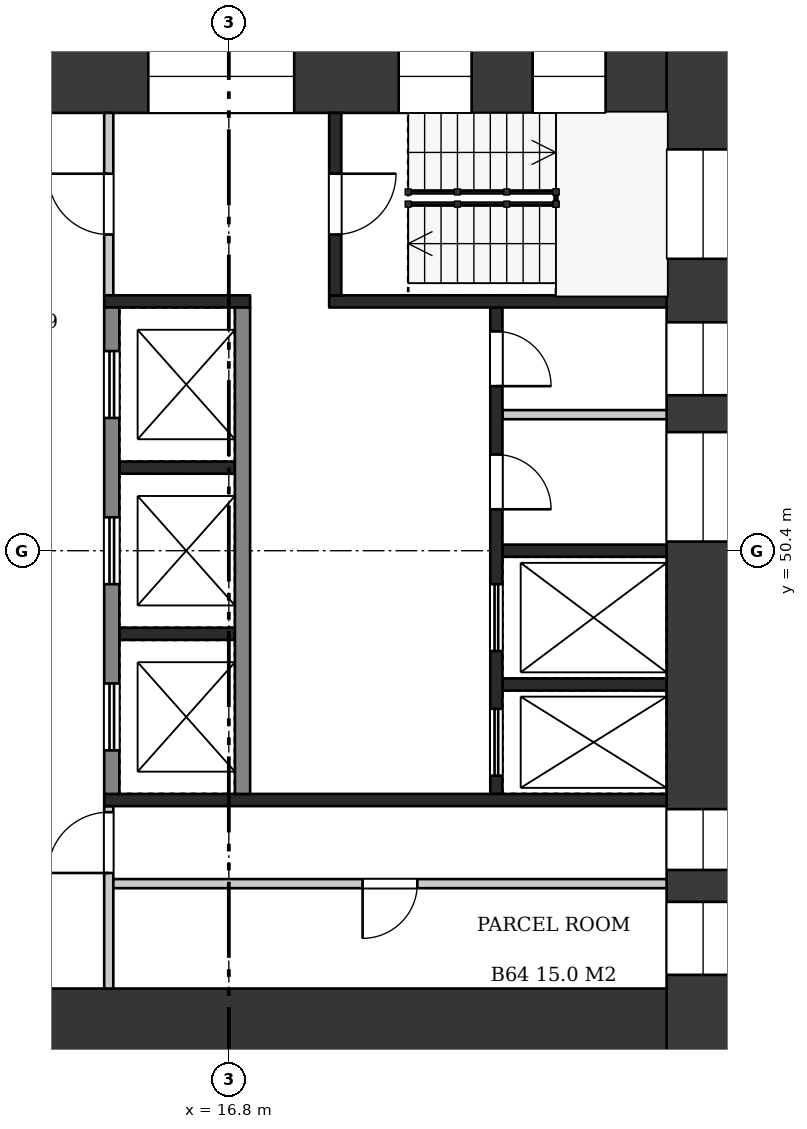
"""IFC4 building model, lengths in metres.
Left out: names, types, materials, properties, quantities, classifications, styles, units other than length and angle.
Written with IfcOpenShell. Run it as: python <this file> out.ifc"""

import sys

from ifc_helpers import new_model, si_unit, direction, frame, frame_2d, origin, place, context, subcontext, project, spatial, rectangle, extrude, element, fill, save


model = new_model("IFC4")
c1 = context("Model", 3, precision=1e-05, world=origin(), true_north=direction((0.0, 1.0)))
c2 = subcontext(c1, "Body", "Model", "MODEL_VIEW")
j1 = project(units=[si_unit("LENGTHUNIT", "METRE"), si_unit("PLANEANGLEUNIT", "RADIAN")], contexts=[c1])
p1 = place(None, origin())
s1 = spatial("IfcSite", under=j1, at=p1, CompositionType="ELEMENT")
p2 = place(p1, origin())
s2 = spatial("IfcBuilding", under=s1, at=p2, CompositionType="ELEMENT")
p3 = place(p2, frame((0.0, 0.0, 245.7)))
s3 = spatial("IfcBuildingStorey", under=s2, at=p3, CompositionType="ELEMENT", Elevation=245.7)
p4 = place(p3, frame((24.6, 58.8, 0.0), z_axis=(0.0, 0.0, 1.0), x_axis=(0.0, -1.0, 0.0)))
e1 = element("IfcWall", 1, at=p4, inside=s3, PredefinedType="SHEAR", context=c2, shape_type="SweptSolid", body=[
    extrude(rectangle(XDim=16.8, YDim=1.2, at=frame_2d((8.4, 0.0))), origin(), (0.0, 0.0, 1.0), 3.22),
])
p5 = place(p4, frame((1.8, 0.0, 0.5)))
e2 = element("IfcOpeningElement", 2, at=p5, cuts=e1, PredefinedType="OPENING", context=c2, shape_type="SweptSolid", body=[
    extrude(rectangle(XDim=1.8, YDim=2.4, at=frame_2d((0.9, 1.2))), frame((0.0, 0.61, 0.0), z_axis=(0.0, -1.0, 0.0), x_axis=(1.0, 0.0, 0.0)), (0.0, 0.0, 1.0), 1.22),
])
p6 = place(p4, frame((4.644, 0.0, 1.6)))
e3 = element("IfcOpeningElement", 3, at=p6, cuts=e1, PredefinedType="OPENING", context=c2, shape_type="SweptSolid", body=[
    extrude(rectangle(XDim=1.2, YDim=1.2, at=frame_2d((0.6, 0.6))), frame((0.0, 0.61, 0.0), z_axis=(0.0, -1.0, 0.0), x_axis=(1.0, 0.0, 0.0)), (0.0, 0.0, 1.0), 1.22),
])
p7 = place(p4, frame((6.45, 0.0, 1.6)))
e4 = element("IfcOpeningElement", 4, at=p7, cuts=e1, PredefinedType="OPENING", context=c2, shape_type="SweptSolid", body=[
    extrude(rectangle(XDim=1.8, YDim=1.2, at=frame_2d((0.9, 0.6))), frame((0.0, 0.61, 0.0), z_axis=(0.0, -1.0, 0.0), x_axis=(1.0, 0.0, 0.0)), (0.0, 0.0, 1.0), 1.22),
])
p8 = place(p4, frame((12.65, 0.0, 0.6)))
e5 = element("IfcOpeningElement", 5, at=p8, cuts=e1, PredefinedType="OPENING", context=c2, shape_type="SweptSolid", body=[
    extrude(rectangle(XDim=1.0, YDim=2.1, at=frame_2d((0.5, 1.05))), frame((0.0, 0.61, 0.0), z_axis=(0.0, -1.0, 0.0), x_axis=(1.0, 0.0, 0.0)), (0.0, 0.0, 1.0), 1.22),
])
p9 = place(p4, frame((14.175, 0.0, 1.6)))
e6 = element("IfcOpeningElement", 6, at=p9, cuts=e1, PredefinedType="OPENING", context=c2, shape_type="SweptSolid", body=[
    extrude(rectangle(XDim=1.2, YDim=1.2, at=frame_2d((0.6, 0.6))), frame((0.0, 0.61, 0.0), z_axis=(0.0, -1.0, 0.0), x_axis=(1.0, 0.0, 0.0)), (0.0, 0.0, 1.0), 1.22),
])
p10 = place(p3, frame((9.6, 58.2, 0.0), z_axis=(0.0, 0.0, 1.0), x_axis=(1.0, 0.0, 0.0)))
e7 = element("IfcWall", 7, at=p10, inside=s3, PredefinedType="SHEAR", context=c2, shape_type="SweptSolid", body=[
    extrude(rectangle(XDim=14.4, YDim=1.2, at=frame_2d((7.2, 0.0))), origin(), (0.0, 0.0, 1.0), 3.22),
])
p11 = place(p10, frame((1.105, 0.0, 0.6)))
e8 = element("IfcOpeningElement", 8, at=p11, cuts=e7, PredefinedType="OPENING", context=c2, shape_type="SweptSolid", body=[
    extrude(rectangle(XDim=3.0, YDim=2.1, at=frame_2d((1.5, 1.05))), frame((0.0, 0.61, 0.0), z_axis=(0.0, -1.0, 0.0), x_axis=(1.0, 0.0, 0.0)), (0.0, 0.0, 1.0), 1.22),
])
p12 = place(p10, frame((5.875, 0.0, 0.6)))
e9 = element("IfcOpeningElement", 9, at=p12, cuts=e7, PredefinedType="OPENING", context=c2, shape_type="SweptSolid", body=[
    extrude(rectangle(XDim=2.4, YDim=2.1, at=frame_2d((1.2, 1.05))), frame((0.0, 0.61, 0.0), z_axis=(0.0, -1.0, 0.0), x_axis=(1.0, 0.0, 0.0)), (0.0, 0.0, 1.0), 1.22),
])
p13 = place(p10, frame((9.993, 0.0, 0.5)))
e10 = element("IfcOpeningElement", 10, at=p13, cuts=e7, PredefinedType="OPENING", context=c2, shape_type="SweptSolid", body=[
    extrude(rectangle(XDim=1.2, YDim=2.4, at=frame_2d((0.6, 1.2))), frame((0.0, 0.61, 0.0), z_axis=(0.0, -1.0, 0.0), x_axis=(1.0, 0.0, 0.0)), (0.0, 0.0, 1.0), 1.22),
])
p14 = place(p10, frame((12.197, 0.0, 0.5)))
e11 = element("IfcOpeningElement", 11, at=p14, cuts=e7, PredefinedType="OPENING", context=c2, shape_type="SweptSolid", body=[
    extrude(rectangle(XDim=1.2, YDim=2.4, at=frame_2d((0.6, 1.2))), frame((0.0, 0.61, 0.0), z_axis=(0.0, -1.0, 0.0), x_axis=(1.0, 0.0, 0.0)), (0.0, 0.0, 1.0), 1.22),
])
p15 = place(p3, frame((9.6, 42.6, 0.0), z_axis=(0.0, 0.0, 1.0), x_axis=(1.0, 0.0, 0.0)))
e12 = element("IfcWall", 12, at=p15, inside=s3, PredefinedType="SHEAR", context=c2, shape_type="SweptSolid", body=[
    extrude(rectangle(XDim=14.4, YDim=1.2, at=frame_2d((7.2, 0.0))), origin(), (0.0, 0.0, 1.0), 3.22),
])
p16 = place(p15, frame((2.1, 0.0, 0.0)))
e13 = element("IfcOpeningElement", 13, at=p16, cuts=e12, PredefinedType="OPENING", context=c2, shape_type="SweptSolid", body=[
    extrude(rectangle(XDim=1.8, YDim=2.1, at=frame_2d((0.9, 1.05))), frame((0.0, 0.61, 0.0), z_axis=(0.0, -1.0, 0.0), x_axis=(1.0, 0.0, 0.0)), (0.0, 0.0, 1.0), 1.22),
])
for number, where, z_axis, x_axis in (
    (14, (15.0, 51.767, 0.0), (0.0, 0.0, 1.0), (1.0, 0.0, 0.0)),
    (15, (15.0, 49.033, 0.0), (0.0, 0.0, 1.0), (1.0, 0.0, 0.0)),
):
    element("IfcWall", number, at=place(p3, frame(where, z_axis=z_axis, x_axis=x_axis)), inside=s3, PredefinedType="SHEAR", context=c2, shape_type="SweptSolid", body=[
        extrude(rectangle(XDim=1.9, YDim=0.2, at=frame_2d((0.95, 0.0))), origin(), (0.0, 0.0, 1.0), 3.22),
    ])
p17 = place(p3, frame((14.875, 54.4, 0.0), z_axis=(0.0, 0.0, 1.0), x_axis=(0.0, -1.0, 0.0)))
e16 = element("IfcWall", 16, at=p17, inside=s3, PredefinedType="SHEAR", context=c2, shape_type="SweptSolid", body=[
    extrude(rectangle(XDim=8.0, YDim=0.25, at=frame_2d((4.0, 0.0))), origin(), (0.0, 0.0, 1.0), 3.22),
])
p18 = place(p17, frame((0.717, 0.0, 0.0)))
e17 = element("IfcOpeningElement", 17, at=p18, cuts=e16, PredefinedType="OPENING", context=c2, shape_type="SweptSolid", body=[
    extrude(rectangle(XDim=1.1, YDim=2.1, at=frame_2d((0.55, 1.05))), frame((0.0, 0.135, 0.0), z_axis=(0.0, -1.0, 0.0), x_axis=(1.0, 0.0, 0.0)), (0.0, 0.0, 1.0), 0.27),
])
p19 = place(p17, frame((3.45, 0.0, 0.0)))
e18 = element("IfcOpeningElement", 18, at=p19, cuts=e16, PredefinedType="OPENING", context=c2, shape_type="SweptSolid", body=[
    extrude(rectangle(XDim=1.1, YDim=2.1, at=frame_2d((0.55, 1.05))), frame((0.0, 0.135, 0.0), z_axis=(0.0, -1.0, 0.0), x_axis=(1.0, 0.0, 0.0)), (0.0, 0.0, 1.0), 0.27),
])
p20 = place(p17, frame((6.183, 0.0, 0.0)))
e19 = element("IfcOpeningElement", 19, at=p20, cuts=e16, PredefinedType="OPENING", context=c2, shape_type="SweptSolid", body=[
    extrude(rectangle(XDim=1.1, YDim=2.1, at=frame_2d((0.55, 1.05))), frame((0.0, 0.135, 0.0), z_axis=(0.0, -1.0, 0.0), x_axis=(1.0, 0.0, 0.0)), (0.0, 0.0, 1.0), 0.27),
])
p21 = place(p3, frame((17.025, 54.4, 0.0), z_axis=(0.0, 0.0, 1.0), x_axis=(0.0, -1.0, 0.0)))
e20 = element("IfcWall", 20, at=p21, inside=s3, PredefinedType="SHEAR", context=c2, shape_type="SweptSolid", body=[
    extrude(rectangle(XDim=8.0, YDim=0.25, at=frame_2d((4.0, 0.0))), origin(), (0.0, 0.0, 1.0), 3.22),
])
for number, where, z_axis, x_axis in (
    (21, (21.3, 50.4, 0.0), (0.0, 0.0, 1.0), (1.0, 0.0, 0.0)),
    (22, (21.3, 48.2, 0.0), (0.0, 0.0, 1.0), (1.0, 0.0, 0.0)),
):
    element("IfcWall", number, at=place(p3, frame(where, z_axis=z_axis, x_axis=x_axis)), inside=s3, PredefinedType="SHEAR", context=c2, shape_type="SweptSolid", body=[
        extrude(rectangle(XDim=2.7, YDim=0.2, at=frame_2d((1.35, 0.0))), origin(), (0.0, 0.0, 1.0), 3.22),
    ])
p22 = place(p3, frame((21.3, 52.637, 0.0), z_axis=(0.0, 0.0, 1.0), x_axis=(1.0, 0.0, 0.0)))
e23 = element("IfcWall", 23, at=p22, inside=s3, PredefinedType="PARTITIONING", context=c2, shape_type="SweptSolid", body=[
    extrude(rectangle(XDim=2.7, YDim=0.15, at=frame_2d((1.35, 0.0))), origin(), (0.0, 0.0, 1.0), 3.22),
])
p23 = place(p3, frame((21.2, 54.4, 0.0), z_axis=(0.0, 0.0, 1.0), x_axis=(0.0, -1.0, 0.0)))
e24 = element("IfcWall", 24, at=p23, inside=s3, PredefinedType="SHEAR", context=c2, shape_type="SweptSolid", body=[
    extrude(rectangle(XDim=8.0, YDim=0.2, at=frame_2d((4.0, 0.0))), origin(), (0.0, 0.0, 1.0), 3.22),
])
p24 = place(p23, frame((0.394, 0.0, 0.0)))
e25 = element("IfcOpeningElement", 25, at=p24, cuts=e24, PredefinedType="OPENING", context=c2, shape_type="SweptSolid", body=[
    extrude(rectangle(XDim=0.9, YDim=2.1, at=frame_2d((0.45, 1.05))), frame((0.0, 0.11, 0.0), z_axis=(0.0, -1.0, 0.0), x_axis=(1.0, 0.0, 0.0)), (0.0, 0.0, 1.0), 0.22),
])
p25 = place(p23, frame((2.419, 0.0, 0.0)))
e26 = element("IfcOpeningElement", 26, at=p25, cuts=e24, PredefinedType="OPENING", context=c2, shape_type="SweptSolid", body=[
    extrude(rectangle(XDim=0.9, YDim=2.1, at=frame_2d((0.45, 1.05))), frame((0.0, 0.11, 0.0), z_axis=(0.0, -1.0, 0.0), x_axis=(1.0, 0.0, 0.0)), (0.0, 0.0, 1.0), 0.22),
])
p26 = place(p23, frame((4.55, 0.0, 0.0)))
e27 = element("IfcOpeningElement", 27, at=p26, cuts=e24, PredefinedType="OPENING", context=c2, shape_type="SweptSolid", body=[
    extrude(rectangle(XDim=1.1, YDim=2.1, at=frame_2d((0.55, 1.05))), frame((0.0, 0.11, 0.0), z_axis=(0.0, -1.0, 0.0), x_axis=(1.0, 0.0, 0.0)), (0.0, 0.0, 1.0), 0.22),
])
p27 = place(p23, frame((6.6, 0.0, 0.0)))
e28 = element("IfcOpeningElement", 28, at=p27, cuts=e24, PredefinedType="OPENING", context=c2, shape_type="SweptSolid", body=[
    extrude(rectangle(XDim=1.1, YDim=2.1, at=frame_2d((0.55, 1.05))), frame((0.0, 0.11, 0.0), z_axis=(0.0, -1.0, 0.0), x_axis=(1.0, 0.0, 0.0)), (0.0, 0.0, 1.0), 0.22),
])
p28 = place(p3, frame((14.75, 54.5, 0.0), z_axis=(0.0, 0.0, 1.0), x_axis=(1.0, 0.0, 0.0)))
e29 = element("IfcWall", 29, at=p28, inside=s3, PredefinedType="SHEAR", context=c2, shape_type="SweptSolid", body=[
    extrude(rectangle(XDim=2.4, YDim=0.2, at=frame_2d((1.2, 0.0))), origin(), (0.0, 0.0, 1.0), 3.22),
])
p29 = place(p3, frame((18.45, 54.5, 0.0), z_axis=(0.0, 0.0, 1.0), x_axis=(1.0, 0.0, 0.0)))
e30 = element("IfcWall", 30, at=p29, inside=s3, PredefinedType="SHEAR", context=c2, shape_type="SweptSolid", body=[
    extrude(rectangle(XDim=5.55, YDim=0.2, at=frame_2d((2.775, 0.0))), origin(), (0.0, 0.0, 1.0), 3.22),
])
p30 = place(p3, frame((14.825, 57.6, 0.0), z_axis=(0.0, 0.0, 1.0), x_axis=(0.0, -1.0, 0.0)))
e31 = element("IfcWall", 31, at=p30, inside=s3, PredefinedType="PARTITIONING", context=c2, shape_type="SweptSolid", body=[
    extrude(rectangle(XDim=3.0, YDim=0.15, at=frame_2d((1.5, 0.0))), origin(), (0.0, 0.0, 1.0), 3.22),
])
p31 = place(p30, frame((1.0, 0.0, 0.0)))
e32 = element("IfcOpeningElement", 32, at=p31, cuts=e31, PredefinedType="OPENING", context=c2, shape_type="SweptSolid", body=[
    extrude(rectangle(XDim=1.0, YDim=2.1, at=frame_2d((0.5, 1.05))), frame((0.0, 0.085, 0.0), z_axis=(0.0, -1.0, 0.0), x_axis=(1.0, 0.0, 0.0)), (0.0, 0.0, 1.0), 0.17),
])
p32 = place(p3, frame((18.55, 57.6, 0.0), z_axis=(0.0, 0.0, 1.0), x_axis=(0.0, -1.0, 0.0)))
e33 = element("IfcWall", 33, at=p32, inside=s3, PredefinedType="SHEAR", context=c2, shape_type="SweptSolid", body=[
    extrude(rectangle(XDim=3.0, YDim=0.2, at=frame_2d((1.5, 0.0))), origin(), (0.0, 0.0, 1.0), 3.22),
])
p33 = place(p32, frame((1.0, 0.0, 0.0)))
e34 = element("IfcOpeningElement", 34, at=p33, cuts=e33, PredefinedType="OPENING", context=c2, shape_type="SweptSolid", body=[
    extrude(rectangle(XDim=1.0, YDim=2.1, at=frame_2d((0.5, 1.05))), frame((0.0, 0.11, 0.0), z_axis=(0.0, -1.0, 0.0), x_axis=(1.0, 0.0, 0.0)), (0.0, 0.0, 1.0), 0.22),
])
p34 = place(p3, frame((14.75, 46.3, 0.0), z_axis=(0.0, 0.0, 1.0), x_axis=(1.0, 0.0, 0.0)))
e35 = element("IfcWall", 35, at=p34, inside=s3, PredefinedType="SHEAR", context=c2, shape_type="SweptSolid", body=[
    extrude(rectangle(XDim=9.25, YDim=0.2, at=frame_2d((4.625, 0.0))), origin(), (0.0, 0.0, 1.0), 3.22),
])
p35 = place(p3, frame((14.825, 46.2, 0.0), z_axis=(0.0, 0.0, 1.0), x_axis=(0.0, -1.0, 0.0)))
e36 = element("IfcWall", 36, at=p35, inside=s3, PredefinedType="PARTITIONING", context=c2, shape_type="SweptSolid", body=[
    extrude(rectangle(XDim=3.0, YDim=0.15, at=frame_2d((1.5, 0.0))), origin(), (0.0, 0.0, 1.0), 3.22),
])
p36 = place(p35, frame((0.1, 0.0, 0.0)))
e37 = element("IfcOpeningElement", 37, at=p36, cuts=e36, PredefinedType="OPENING", context=c2, shape_type="SweptSolid", body=[
    extrude(rectangle(XDim=1.0, YDim=2.1, at=frame_2d((0.5, 1.05))), frame((0.0, 0.085, 0.0), z_axis=(0.0, -1.0, 0.0), x_axis=(1.0, 0.0, 0.0)), (0.0, 0.0, 1.0), 0.17),
])
p37 = place(p3, frame((14.9, 44.925, 0.0), z_axis=(0.0, 0.0, 1.0), x_axis=(1.0, 0.0, 0.0)))
e38 = element("IfcWall", 38, at=p37, inside=s3, PredefinedType="PARTITIONING", context=c2, shape_type="SweptSolid", body=[
    extrude(rectangle(XDim=9.1, YDim=0.15, at=frame_2d((4.55, 0.0))), origin(), (0.0, 0.0, 1.0), 3.22),
])
p38 = place(p37, frame((4.1, 0.0, 0.0)))
e39 = element("IfcOpeningElement", 39, at=p38, cuts=e38, PredefinedType="OPENING", context=c2, shape_type="SweptSolid", body=[
    extrude(rectangle(XDim=0.9, YDim=2.1, at=frame_2d((0.45, 1.05))), frame((0.0, 0.085, 0.0), z_axis=(0.0, -1.0, 0.0), x_axis=(1.0, 0.0, 0.0)), (0.0, 0.0, 1.0), 0.17),
])
p39 = place(p18, origin())
e40 = element("IfcDoor", 40, at=p39, inside=s3, OperationType="DOUBLE_DOOR_SLIDING", PredefinedType="DOOR", context=c2, shape_type="SweptSolid", body=[
    extrude(rectangle(XDim=1.1, YDim=2.1, at=frame_2d((0.55, 1.05))), frame((0.0, 0.025, 0.0), z_axis=(0.0, -1.0, 0.0), x_axis=(1.0, 0.0, 0.0)), (0.0, 0.0, 1.0), 0.05),
])
fill(e17, e40)
p40 = place(p19, origin())
e41 = element("IfcDoor", 41, at=p40, inside=s3, OperationType="DOUBLE_DOOR_SLIDING", PredefinedType="DOOR", context=c2, shape_type="SweptSolid", body=[
    extrude(rectangle(XDim=1.1, YDim=2.1, at=frame_2d((0.55, 1.05))), frame((0.0, 0.025, 0.0), z_axis=(0.0, -1.0, 0.0), x_axis=(1.0, 0.0, 0.0)), (0.0, 0.0, 1.0), 0.05),
])
fill(e18, e41)
p41 = place(p20, origin())
e42 = element("IfcDoor", 42, at=p41, inside=s3, OperationType="DOUBLE_DOOR_SLIDING", PredefinedType="DOOR", context=c2, shape_type="SweptSolid", body=[
    extrude(rectangle(XDim=1.1, YDim=2.1, at=frame_2d((0.55, 1.05))), frame((0.0, 0.025, 0.0), z_axis=(0.0, -1.0, 0.0), x_axis=(1.0, 0.0, 0.0)), (0.0, 0.0, 1.0), 0.05),
])
fill(e19, e42)
p42 = place(p24, origin())
e43 = element("IfcDoor", 43, at=p42, inside=s3, OperationType="SINGLE_SWING_RIGHT", PredefinedType="DOOR", context=c2, shape_type="SweptSolid", body=[
    extrude(rectangle(XDim=0.9, YDim=2.1, at=frame_2d((0.45, 1.05))), frame((0.0, 0.025, 0.0), z_axis=(0.0, -1.0, 0.0), x_axis=(1.0, 0.0, 0.0)), (0.0, 0.0, 1.0), 0.05),
])
fill(e25, e43)
p43 = place(p25, origin())
e44 = element("IfcDoor", 44, at=p43, inside=s3, OperationType="SINGLE_SWING_RIGHT", PredefinedType="DOOR", context=c2, shape_type="SweptSolid", body=[
    extrude(rectangle(XDim=0.9, YDim=2.1, at=frame_2d((0.45, 1.05))), frame((0.0, 0.025, 0.0), z_axis=(0.0, -1.0, 0.0), x_axis=(1.0, 0.0, 0.0)), (0.0, 0.0, 1.0), 0.05),
])
fill(e26, e44)
p44 = place(p26, origin())
e45 = element("IfcDoor", 45, at=p44, inside=s3, OperationType="DOUBLE_DOOR_SLIDING", PredefinedType="DOOR", context=c2, shape_type="SweptSolid", body=[
    extrude(rectangle(XDim=1.1, YDim=2.1, at=frame_2d((0.55, 1.05))), frame((0.0, 0.025, 0.0), z_axis=(0.0, -1.0, 0.0), x_axis=(1.0, 0.0, 0.0)), (0.0, 0.0, 1.0), 0.05),
])
fill(e27, e45)
p45 = place(p27, origin())
e46 = element("IfcDoor", 46, at=p45, inside=s3, OperationType="DOUBLE_DOOR_SLIDING", PredefinedType="DOOR", context=c2, shape_type="SweptSolid", body=[
    extrude(rectangle(XDim=1.1, YDim=2.1, at=frame_2d((0.55, 1.05))), frame((0.0, 0.025, 0.0), z_axis=(0.0, -1.0, 0.0), x_axis=(1.0, 0.0, 0.0)), (0.0, 0.0, 1.0), 0.05),
])
fill(e28, e46)
p46 = place(p31, frame((1.0, 0.0, 0.0), z_axis=(0.0, 0.0, 1.0), x_axis=(-1.0, 0.0, 0.0)))
e47 = element("IfcDoor", 47, at=p46, inside=s3, OperationType="SINGLE_SWING_RIGHT", PredefinedType="DOOR", context=c2, shape_type="SweptSolid", body=[
    extrude(rectangle(XDim=1.0, YDim=2.1, at=frame_2d((0.5, 1.05))), frame((0.0, 0.025, 0.0), z_axis=(0.0, -1.0, 0.0), x_axis=(1.0, 0.0, 0.0)), (0.0, 0.0, 1.0), 0.05),
])
fill(e32, e47)
p47 = place(p33, origin())
e48 = element("IfcDoor", 48, at=p47, inside=s3, OperationType="SINGLE_SWING_LEFT", PredefinedType="DOOR", context=c2, shape_type="SweptSolid", body=[
    extrude(rectangle(XDim=1.0, YDim=2.1, at=frame_2d((0.5, 1.05))), frame((0.0, 0.025, 0.0), z_axis=(0.0, -1.0, 0.0), x_axis=(1.0, 0.0, 0.0)), (0.0, 0.0, 1.0), 0.05),
])
fill(e34, e48)
p48 = place(p36, frame((1.0, 0.0, 0.0), z_axis=(0.0, 0.0, 1.0), x_axis=(-1.0, 0.0, 0.0)))
e49 = element("IfcDoor", 49, at=p48, inside=s3, OperationType="SINGLE_SWING_LEFT", PredefinedType="DOOR", context=c2, shape_type="SweptSolid", body=[
    extrude(rectangle(XDim=1.0, YDim=2.1, at=frame_2d((0.5, 1.05))), frame((0.0, 0.025, 0.0), z_axis=(0.0, -1.0, 0.0), x_axis=(1.0, 0.0, 0.0)), (0.0, 0.0, 1.0), 0.05),
])
fill(e37, e49)
p49 = place(p38, frame((0.9, 0.0, 0.0), z_axis=(0.0, 0.0, 1.0), x_axis=(-1.0, 0.0, 0.0)))
e50 = element("IfcDoor", 50, at=p49, inside=s3, OperationType="SINGLE_SWING_RIGHT", PredefinedType="DOOR", context=c2, shape_type="SweptSolid", body=[
    extrude(rectangle(XDim=0.9, YDim=2.1, at=frame_2d((0.45, 1.05))), frame((0.0, 0.025, 0.0), z_axis=(0.0, -1.0, 0.0), x_axis=(1.0, 0.0, 0.0)), (0.0, 0.0, 1.0), 0.05),
])
fill(e39, e50)
p50 = place(p5, origin())
e51 = element("IfcWindow", 51, at=p50, inside=s3, PartitioningType="SINGLE_PANEL", PredefinedType="WINDOW", context=c2, shape_type="SweptSolid", body=[
    extrude(rectangle(XDim=1.8, YDim=2.4, at=frame_2d((0.9, 1.2))), frame((0.0, 0.03, 0.0), z_axis=(0.0, -1.0, 0.0), x_axis=(1.0, 0.0, 0.0)), (0.0, 0.0, 1.0), 0.06),
])
fill(e2, e51)
p51 = place(p6, origin())
e52 = element("IfcWindow", 52, at=p51, inside=s3, PartitioningType="SINGLE_PANEL", PredefinedType="WINDOW", context=c2, shape_type="SweptSolid", body=[
    extrude(rectangle(XDim=1.2, YDim=1.2, at=frame_2d((0.6, 0.6))), frame((0.0, 0.03, 0.0), z_axis=(0.0, -1.0, 0.0), x_axis=(1.0, 0.0, 0.0)), (0.0, 0.0, 1.0), 0.06),
])
fill(e3, e52)
p52 = place(p7, origin())
e53 = element("IfcWindow", 53, at=p52, inside=s3, PartitioningType="SINGLE_PANEL", PredefinedType="WINDOW", context=c2, shape_type="SweptSolid", body=[
    extrude(rectangle(XDim=1.8, YDim=1.2, at=frame_2d((0.9, 0.6))), frame((0.0, 0.03, 0.0), z_axis=(0.0, -1.0, 0.0), x_axis=(1.0, 0.0, 0.0)), (0.0, 0.0, 1.0), 0.06),
])
fill(e4, e53)
p53 = place(p8, origin())
e54 = element("IfcWindow", 54, at=p53, inside=s3, PartitioningType="SINGLE_PANEL", PredefinedType="WINDOW", context=c2, shape_type="SweptSolid", body=[
    extrude(rectangle(XDim=1.0, YDim=2.1, at=frame_2d((0.5, 1.05))), frame((0.0, 0.03, 0.0), z_axis=(0.0, -1.0, 0.0), x_axis=(1.0, 0.0, 0.0)), (0.0, 0.0, 1.0), 0.06),
])
fill(e5, e54)
p54 = place(p9, origin())
e55 = element("IfcWindow", 55, at=p54, inside=s3, PartitioningType="SINGLE_PANEL", PredefinedType="WINDOW", context=c2, shape_type="SweptSolid", body=[
    extrude(rectangle(XDim=1.2, YDim=1.2, at=frame_2d((0.6, 0.6))), frame((0.0, 0.03, 0.0), z_axis=(0.0, -1.0, 0.0), x_axis=(1.0, 0.0, 0.0)), (0.0, 0.0, 1.0), 0.06),
])
fill(e6, e55)
p55 = place(p12, origin())
e56 = element("IfcWindow", 56, at=p55, inside=s3, PartitioningType="SINGLE_PANEL", PredefinedType="WINDOW", context=c2, shape_type="SweptSolid", body=[
    extrude(rectangle(XDim=2.4, YDim=2.1, at=frame_2d((1.2, 1.05))), frame((0.0, 0.03, 0.0), z_axis=(0.0, -1.0, 0.0), x_axis=(1.0, 0.0, 0.0)), (0.0, 0.0, 1.0), 0.06),
])
fill(e9, e56)
p56 = place(p13, origin())
e57 = element("IfcWindow", 57, at=p56, inside=s3, PartitioningType="SINGLE_PANEL", PredefinedType="WINDOW", context=c2, shape_type="SweptSolid", body=[
    extrude(rectangle(XDim=1.2, YDim=2.4, at=frame_2d((0.6, 1.2))), frame((0.0, 0.03, 0.0), z_axis=(0.0, -1.0, 0.0), x_axis=(1.0, 0.0, 0.0)), (0.0, 0.0, 1.0), 0.06),
])
fill(e10, e57)
p57 = place(p14, origin())
e58 = element("IfcWindow", 58, at=p57, inside=s3, PartitioningType="SINGLE_PANEL", PredefinedType="WINDOW", context=c2, shape_type="SweptSolid", body=[
    extrude(rectangle(XDim=1.2, YDim=2.4, at=frame_2d((0.6, 1.2))), frame((0.0, 0.03, 0.0), z_axis=(0.0, -1.0, 0.0), x_axis=(1.0, 0.0, 0.0)), (0.0, 0.0, 1.0), 0.06),
])
fill(e11, e58)
save(model, sys.argv[1])
